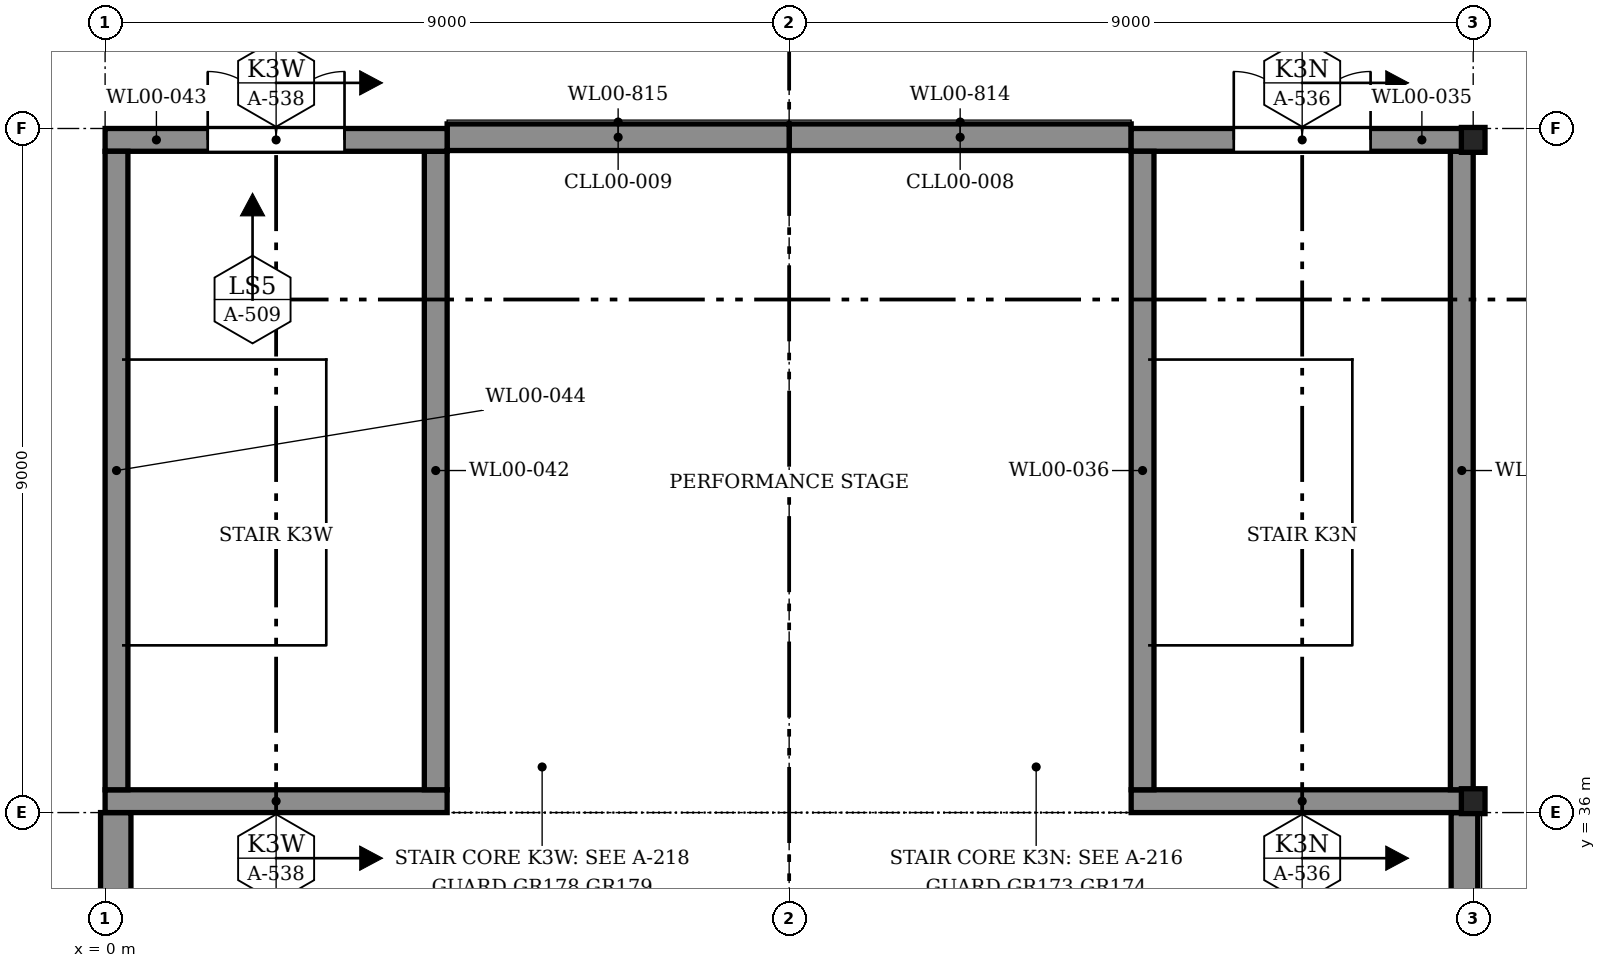
"""IFC4 building model, lengths in metres.
Left out: names, types, materials, properties, quantities, classifications, styles, units other than length and angle.
Written with IfcOpenShell. Run it as: python <this file> out.ifc"""

import sys

from ifc_helpers import new_model, si_unit, direction, frame, frame_2d, origin, origin_2d, place, context, subcontext, project, spatial, polyline, rectangle, i_section, outline, extrude, element, fill, save


model = new_model("IFC4")
c1 = context("Model", 3, precision=1e-05, world=origin(), true_north=direction((0.0, 1.0)))
c2 = subcontext(c1, "Body", "Model", "MODEL_VIEW")
j1 = project(units=[si_unit("LENGTHUNIT", "METRE"), si_unit("PLANEANGLEUNIT", "RADIAN")], contexts=[c1])
p1 = place(None, origin())
s1 = spatial("IfcSite", under=j1, at=p1, CompositionType="ELEMENT")
p2 = place(p1, origin())
s2 = spatial("IfcBuilding", under=s1, at=p2, CompositionType="ELEMENT")
p3 = place(p2, origin())
s3 = spatial("IfcBuildingStorey", under=s2, at=p3, CompositionType="ELEMENT", Elevation=0.0)
for number, where, z_axis, x_axis in (
    (1, (18.0, 36.15, 0.0), (0.0, 0.0, 1.0), (1.0, 0.0, 0.0)),
    (2, (18.0, 44.85, 0.0), (0.0, 0.0, 1.0), (1.0, 0.0, 0.0)),
):
    element("IfcColumn", number, at=place(p3, frame(where, z_axis=z_axis, x_axis=x_axis)), inside=s3, PredefinedType="COLUMN", context=c2, shape_type="SweptSolid", body=[
        extrude(i_section(OverallWidth=0.311, OverallDepth=0.327, WebThickness=0.016, FlangeThickness=0.025, FilletRadius=0.017, at=origin_2d()), origin(), (0.0, 0.0, 1.0), 5.0),
    ])
p4 = place(p3, frame((0.14, 27.0, 0.0), z_axis=(0.0, 0.0, 1.0), x_axis=(0.0, 1.0, 0.0)))
e3 = element("IfcWall", 3, at=p4, inside=s3, PredefinedType="SOLIDWALL", context=c2, shape_type="SweptSolid", body=[
    extrude(outline(polyline([(0.0, 0.0), (9.0, 0.0), (9.0, 16.16), (0.0, 15.44), (0.0, 0.0)])), frame((0.0, 0.2, 0.0), z_axis=(0.0, -1.0, 0.0), x_axis=(1.0, 0.0, 0.0)), (0.0, 0.0, 1.0), 0.4),
])
p5 = place(p3, frame((17.885, 27.164, 0.0), z_axis=(0.0, 0.0, 1.0), x_axis=(0.0, 1.0, 0.0)))
e4 = element("IfcWall", 4, at=p5, inside=s3, PredefinedType="SOLIDWALL", context=c2, shape_type="SweptSolid", body=[
    extrude(outline(polyline([(0.0, 0.0), (8.836, 0.0), (8.836, 16.16), (0.0, 15.453), (0.0, 0.0)])), frame((0.0, 0.175, 0.0), z_axis=(0.0, -1.0, 0.0), x_axis=(1.0, 0.0, 0.0)), (0.0, 0.0, 1.0), 0.35),
])
for number, where, z_axis, x_axis in (
    (5, (9.0, 44.885, 0.0), (0.0, 0.0, 1.0), (1.0, 0.0, 0.0)),
    (6, (4.5, 44.885, 0.0), (0.0, 0.0, 1.0), (1.0, 0.0, 0.0)),
):
    element("IfcWall", number, at=place(p3, frame(where, z_axis=z_axis, x_axis=x_axis)), inside=s3, PredefinedType="SOLIDWALL", context=c2, shape_type="SweptSolid", body=[
        extrude(rectangle(XDim=4.5, YDim=0.35, at=frame_2d((2.25, 0.0))), origin(), (0.0, 0.0, 1.0), 16.871),
    ])
p6 = place(p3, frame((13.5, 36.15, 0.0), z_axis=(0.0, 0.0, 1.0), x_axis=(1.0, 0.0, 0.0)))
e7 = element("IfcWall", 7, at=p6, inside=s3, PredefinedType="SOLIDWALL", context=c2, shape_type="SweptSolid", body=[
    extrude(rectangle(XDim=4.5, YDim=0.3, at=frame_2d((2.25, 0.0))), origin(), (0.0, 0.0, 1.0), 4.75),
])
p7 = place(p3, frame((17.85, 36.3, 0.0), z_axis=(0.0, 0.0, 1.0), x_axis=(0.0, 1.0, 0.0)))
e8 = element("IfcWall", 8, at=p7, inside=s3, PredefinedType="SOLIDWALL", context=c2, shape_type="SweptSolid", body=[
    extrude(rectangle(XDim=8.4, YDim=0.3, at=frame_2d((4.2, 0.0))), origin(), (0.0, 0.0, 1.0), 4.75),
])
p8 = place(p3, frame((13.5, 44.85, 0.0), z_axis=(0.0, 0.0, 1.0), x_axis=(1.0, 0.0, 0.0)))
e9 = element("IfcWall", 9, at=p8, inside=s3, PredefinedType="SOLIDWALL", context=c2, shape_type="SweptSolid", body=[
    extrude(rectangle(XDim=4.5, YDim=0.3, at=frame_2d((2.25, 0.0))), origin(), (0.0, 0.0, 1.0), 4.75),
])
p9 = place(p8, frame((1.35, 0.0, 0.0)))
e10 = element("IfcOpeningElement", 10, at=p9, cuts=e9, PredefinedType="OPENING", context=c2, shape_type="SweptSolid", body=[
    extrude(rectangle(XDim=1.8, YDim=2.1, at=frame_2d((0.9, 1.05))), frame((0.0, 0.16, 0.0), z_axis=(0.0, -1.0, 0.0), x_axis=(1.0, 0.0, 0.0)), (0.0, 0.0, 1.0), 0.32),
])
p10 = place(p3, frame((13.65, 36.3, 0.0), z_axis=(0.0, 0.0, 1.0), x_axis=(0.0, 1.0, 0.0)))
e11 = element("IfcWall", 11, at=p10, inside=s3, PredefinedType="SOLIDWALL", context=c2, shape_type="SweptSolid", body=[
    extrude(rectangle(XDim=8.4, YDim=0.3, at=frame_2d((4.2, 0.0))), origin(), (0.0, 0.0, 1.0), 4.75),
])
p11 = place(p3, frame((0.0, 36.15, 0.0), z_axis=(0.0, 0.0, 1.0), x_axis=(1.0, 0.0, 0.0)))
e12 = element("IfcWall", 12, at=p11, inside=s3, PredefinedType="SOLIDWALL", context=c2, shape_type="SweptSolid", body=[
    extrude(rectangle(XDim=4.5, YDim=0.3, at=frame_2d((2.25, 0.0))), origin(), (0.0, 0.0, 1.0), 4.75),
])
p12 = place(p3, frame((4.35, 36.3, 0.0), z_axis=(0.0, 0.0, 1.0), x_axis=(0.0, 1.0, 0.0)))
e13 = element("IfcWall", 13, at=p12, inside=s3, PredefinedType="SOLIDWALL", context=c2, shape_type="SweptSolid", body=[
    extrude(rectangle(XDim=8.4, YDim=0.3, at=frame_2d((4.2, 0.0))), origin(), (0.0, 0.0, 1.0), 4.75),
])
p13 = place(p3, frame((0.0, 44.85, 0.0), z_axis=(0.0, 0.0, 1.0), x_axis=(1.0, 0.0, 0.0)))
e14 = element("IfcWall", 14, at=p13, inside=s3, PredefinedType="SOLIDWALL", context=c2, shape_type="SweptSolid", body=[
    extrude(rectangle(XDim=4.5, YDim=0.3, at=frame_2d((2.25, 0.0))), origin(), (0.0, 0.0, 1.0), 4.75),
])
p14 = place(p13, frame((1.35, 0.0, 0.0)))
e15 = element("IfcOpeningElement", 15, at=p14, cuts=e14, PredefinedType="OPENING", context=c2, shape_type="SweptSolid", body=[
    extrude(rectangle(XDim=1.8, YDim=2.1, at=frame_2d((0.9, 1.05))), frame((0.0, 0.16, 0.0), z_axis=(0.0, -1.0, 0.0), x_axis=(1.0, 0.0, 0.0)), (0.0, 0.0, 1.0), 0.32),
])
p15 = place(p3, frame((0.15, 36.3, 0.0), z_axis=(0.0, 0.0, 1.0), x_axis=(0.0, 1.0, 0.0)))
e16 = element("IfcWall", 16, at=p15, inside=s3, PredefinedType="SOLIDWALL", context=c2, shape_type="SweptSolid", body=[
    extrude(rectangle(XDim=8.4, YDim=0.3, at=frame_2d((4.2, 0.0))), origin(), (0.0, 0.0, 1.0), 4.75),
])
p16 = place(p9, origin())
e17 = element("IfcDoor", 17, at=p16, inside=s3, OperationType="DOUBLE_DOOR_SINGLE_SWING", PredefinedType="DOOR", context=c2, shape_type="SweptSolid", body=[
    extrude(rectangle(XDim=1.8, YDim=2.1, at=frame_2d((0.9, 1.05))), frame((0.0, 0.025, 0.0), z_axis=(0.0, -1.0, 0.0), x_axis=(1.0, 0.0, 0.0)), (0.0, 0.0, 1.0), 0.05),
])
fill(e10, e17)
p17 = place(p14, origin())
e18 = element("IfcDoor", 18, at=p17, inside=s3, OperationType="DOUBLE_DOOR_SINGLE_SWING", PredefinedType="DOOR", context=c2, shape_type="SweptSolid", body=[
    extrude(rectangle(XDim=1.8, YDim=2.1, at=frame_2d((0.9, 1.05))), frame((0.0, 0.025, 0.0), z_axis=(0.0, -1.0, 0.0), x_axis=(1.0, 0.0, 0.0)), (0.0, 0.0, 1.0), 0.05),
])
fill(e15, e18)
save(model, sys.argv[1])
